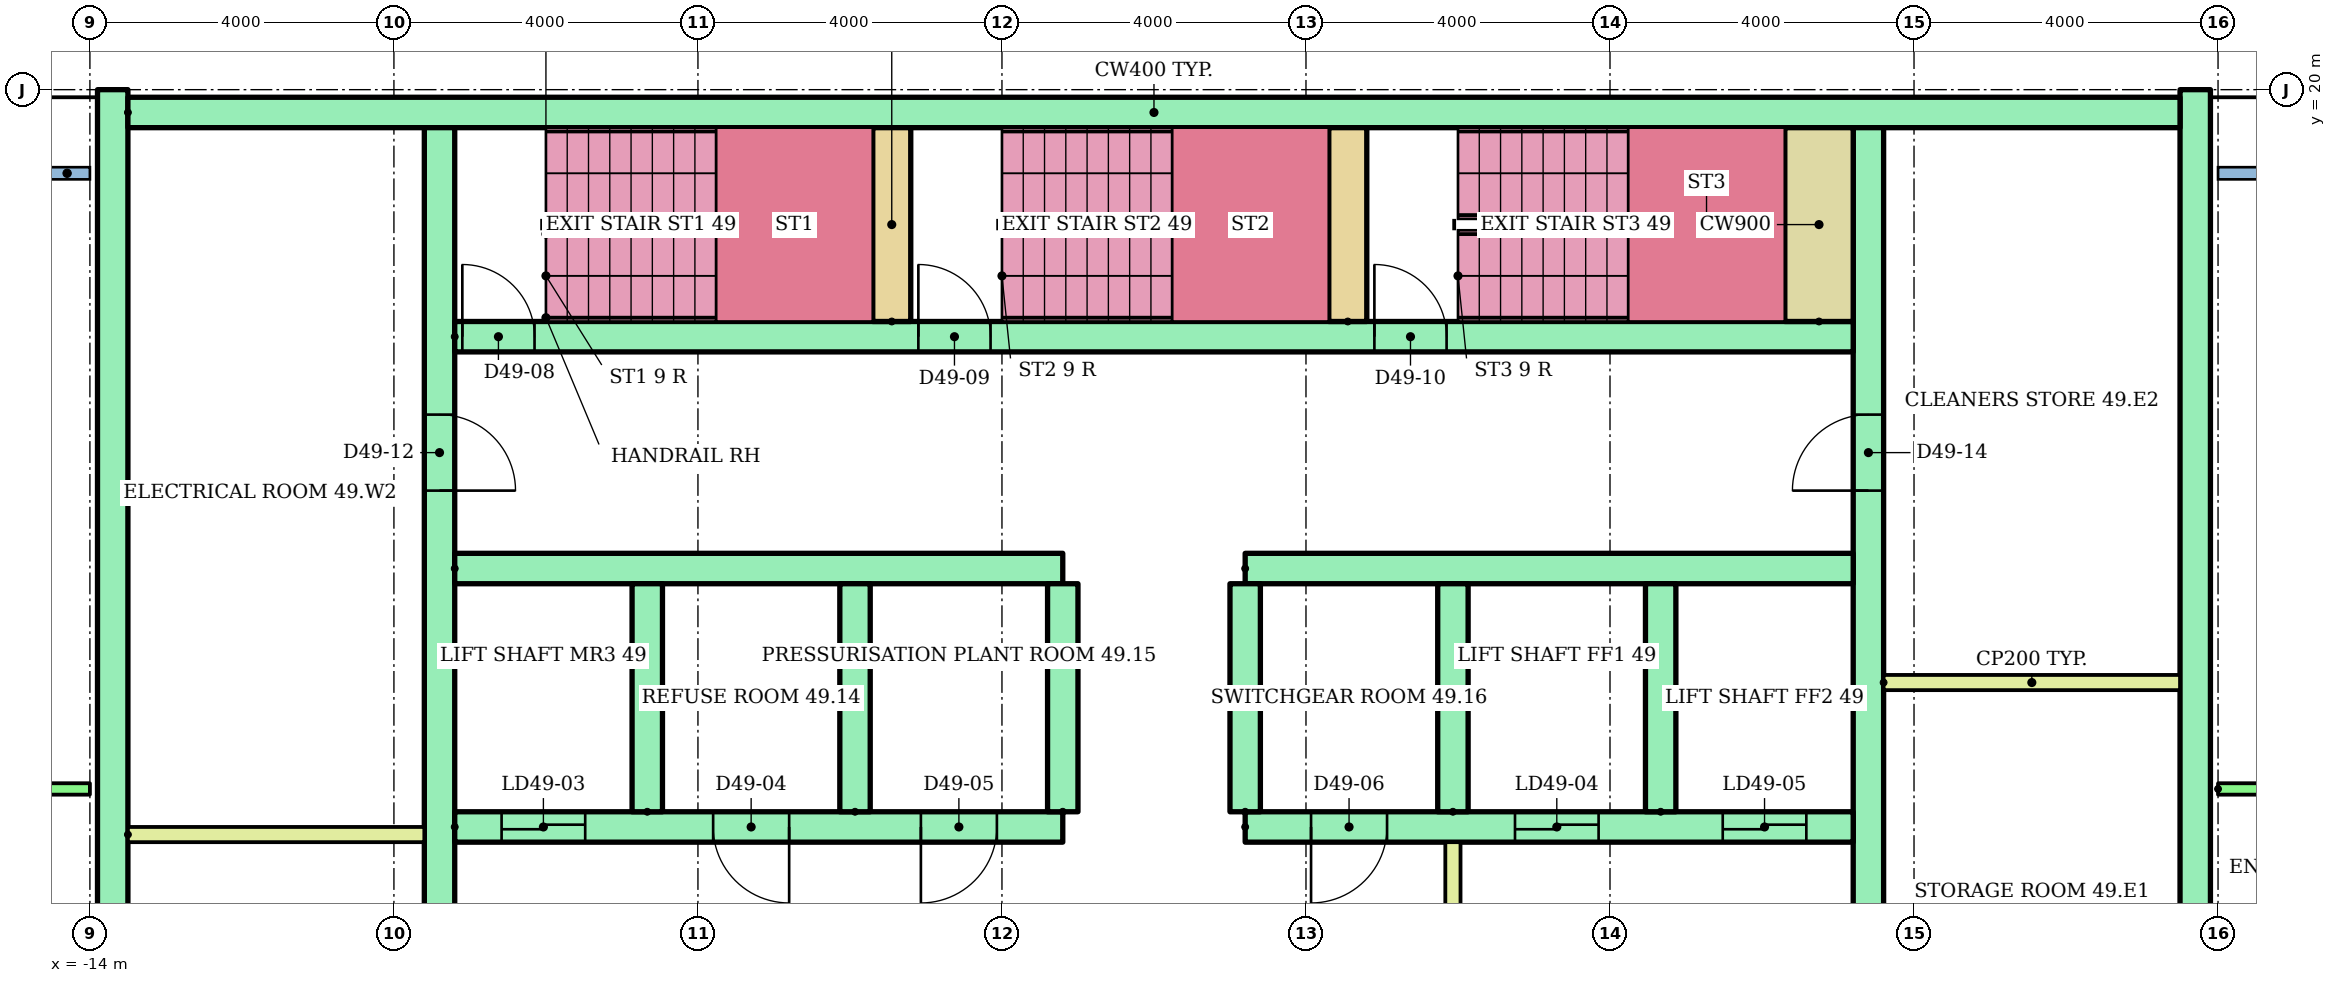
"""IFC4 building model, lengths in metres.
Left out: names, types, materials, properties, quantities, classifications, styles, units other than length and angle.
Written with IfcOpenShell. Run it as: python <this file> out.ifc"""

import sys

from ifc_helpers import new_model, si_unit, direction, frame, frame_2d, origin, place, context, subcontext, project, spatial, rectangle, extrude, element, fill, save


model = new_model("IFC4")
c1 = context("Model", 3, precision=1e-05, world=origin(), true_north=direction((0.0, 1.0)))
c2 = subcontext(c1, "Body", "Model", "MODEL_VIEW")
j1 = project(units=[si_unit("LENGTHUNIT", "METRE"), si_unit("PLANEANGLEUNIT", "RADIAN")], contexts=[c1])
p1 = place(None, origin())
s1 = spatial("IfcSite", under=j1, at=p1, CompositionType="ELEMENT")
p2 = place(p1, origin())
s2 = spatial("IfcBuilding", under=s1, at=p2, CompositionType="ELEMENT")
p3 = place(p2, frame((0.0, 0.0, 187.7)))
s3 = spatial("IfcBuildingStorey", under=s2, at=p3, CompositionType="ELEMENT", Elevation=187.7)
for number, where, z_axis, x_axis in (
    (1, (-13.7, 3.0, 0.0), (0.0, 0.0, 1.0), (0.0, 1.0, 0.0)),
    (2, (13.7, 3.0, 0.0), (0.0, 0.0, 1.0), (0.0, 1.0, 0.0)),
):
    element("IfcWall", number, at=place(p3, frame(where, z_axis=z_axis, x_axis=x_axis)), inside=s3, PredefinedType="SHEAR", context=c2, shape_type="SweptSolid", body=[
        extrude(rectangle(XDim=17.0, YDim=0.4, at=frame_2d((8.5, 0.0))), origin(), (0.0, 0.0, 1.0), 2.92),
    ])
p4 = place(p3, frame((-13.5, 19.7, 0.0)))
e3 = element("IfcWall", 3, at=p4, inside=s3, PredefinedType="SHEAR", context=c2, shape_type="SweptSolid", body=[
    extrude(rectangle(XDim=27.0, YDim=0.4, at=frame_2d((13.5, 0.0))), origin(), (0.0, 0.0, 1.0), 2.92),
])
p5 = place(p3, frame((-9.4, 6.8, 0.0), z_axis=(0.0, 0.0, 1.0), x_axis=(0.0, 1.0, 0.0)))
e4 = element("IfcWall", 4, at=p5, inside=s3, PredefinedType="SHEAR", context=c2, shape_type="SweptSolid", body=[
    extrude(rectangle(XDim=12.7, YDim=0.4, at=frame_2d((6.35, 0.0))), origin(), (0.0, 0.0, 1.0), 2.92),
])
p6 = place(p5, frame((1.15, 0.0, 0.0)))
e5 = element("IfcOpeningElement", 5, at=p6, cuts=e4, PredefinedType="OPENING", context=c2, shape_type="SweptSolid", body=[
    extrude(rectangle(XDim=1.0, YDim=2.1, at=frame_2d((0.5, 1.05))), frame((0.0, 0.21, 0.0), z_axis=(0.0, -1.0, 0.0), x_axis=(1.0, 0.0, 0.0)), (0.0, 0.0, 1.0), 0.42),
])
p7 = place(p5, frame((7.925, 0.0, 0.0)))
e6 = element("IfcOpeningElement", 6, at=p7, cuts=e4, PredefinedType="OPENING", context=c2, shape_type="SweptSolid", body=[
    extrude(rectangle(XDim=1.0, YDim=2.1, at=frame_2d((0.5, 1.05))), frame((0.0, 0.21, 0.0), z_axis=(0.0, -1.0, 0.0), x_axis=(1.0, 0.0, 0.0)), (0.0, 0.0, 1.0), 0.42),
])
p8 = place(p3, frame((9.4, 6.8, 0.0), z_axis=(0.0, 0.0, 1.0), x_axis=(0.0, 1.0, 0.0)))
e7 = element("IfcWall", 7, at=p8, inside=s3, PredefinedType="SHEAR", context=c2, shape_type="SweptSolid", body=[
    extrude(rectangle(XDim=12.7, YDim=0.4, at=frame_2d((6.35, 0.0))), origin(), (0.0, 0.0, 1.0), 2.92),
])
p9 = place(p8, frame((1.15, 0.0, 0.0)))
e8 = element("IfcOpeningElement", 8, at=p9, cuts=e7, PredefinedType="OPENING", context=c2, shape_type="SweptSolid", body=[
    extrude(rectangle(XDim=1.0, YDim=2.1, at=frame_2d((0.5, 1.05))), frame((0.0, 0.21, 0.0), z_axis=(0.0, -1.0, 0.0), x_axis=(1.0, 0.0, 0.0)), (0.0, 0.0, 1.0), 0.42),
])
p10 = place(p8, frame((7.925, 0.0, 0.0)))
e9 = element("IfcOpeningElement", 9, at=p10, cuts=e7, PredefinedType="OPENING", context=c2, shape_type="SweptSolid", body=[
    extrude(rectangle(XDim=1.0, YDim=2.1, at=frame_2d((0.5, 1.05))), frame((0.0, 0.21, 0.0), z_axis=(0.0, -1.0, 0.0), x_axis=(1.0, 0.0, 0.0)), (0.0, 0.0, 1.0), 0.42),
])
p11 = place(p3, frame((-9.2, 10.3, 0.0)))
e10 = element("IfcWall", 10, at=p11, inside=s3, PredefinedType="SHEAR", context=c2, shape_type="SweptSolid", body=[
    extrude(rectangle(XDim=8.0, YDim=0.4, at=frame_2d((4.0, 0.0))), origin(), (0.0, 0.0, 1.0), 2.92),
])
p12 = place(p11, frame((0.617, 0.0, 0.0)))
e11 = element("IfcOpeningElement", 11, at=p12, cuts=e10, PredefinedType="OPENING", context=c2, shape_type="SweptSolid", body=[
    extrude(rectangle(XDim=1.1, YDim=2.1, at=frame_2d((0.55, 1.05))), frame((0.0, 0.21, 0.0), z_axis=(0.0, -1.0, 0.0), x_axis=(1.0, 0.0, 0.0)), (0.0, 0.0, 1.0), 0.42),
])
p13 = place(p11, frame((3.4, 0.0, 0.0)))
e12 = element("IfcOpeningElement", 12, at=p13, cuts=e10, PredefinedType="OPENING", context=c2, shape_type="SweptSolid", body=[
    extrude(rectangle(XDim=1.0, YDim=2.1, at=frame_2d((0.5, 1.05))), frame((0.0, 0.21, 0.0), z_axis=(0.0, -1.0, 0.0), x_axis=(1.0, 0.0, 0.0)), (0.0, 0.0, 1.0), 0.42),
])
p14 = place(p11, frame((6.133, 0.0, 0.0)))
e13 = element("IfcOpeningElement", 13, at=p14, cuts=e10, PredefinedType="OPENING", context=c2, shape_type="SweptSolid", body=[
    extrude(rectangle(XDim=1.0, YDim=2.1, at=frame_2d((0.5, 1.05))), frame((0.0, 0.21, 0.0), z_axis=(0.0, -1.0, 0.0), x_axis=(1.0, 0.0, 0.0)), (0.0, 0.0, 1.0), 0.42),
])
p15 = place(p3, frame((-9.2, 13.7, 0.0)))
e14 = element("IfcWall", 14, at=p15, inside=s3, PredefinedType="SHEAR", context=c2, shape_type="SweptSolid", body=[
    extrude(rectangle(XDim=8.0, YDim=0.4, at=frame_2d((4.0, 0.0))), origin(), (0.0, 0.0, 1.0), 2.92),
])
p16 = place(p3, frame((1.2, 10.3, 0.0)))
e15 = element("IfcWall", 15, at=p16, inside=s3, PredefinedType="SHEAR", context=c2, shape_type="SweptSolid", body=[
    extrude(rectangle(XDim=8.0, YDim=0.4, at=frame_2d((4.0, 0.0))), origin(), (0.0, 0.0, 1.0), 2.92),
])
p17 = place(p16, frame((3.55, 0.0, 0.0)))
e16 = element("IfcOpeningElement", 16, at=p17, cuts=e15, PredefinedType="OPENING", context=c2, shape_type="SweptSolid", body=[
    extrude(rectangle(XDim=1.1, YDim=2.1, at=frame_2d((0.55, 1.05))), frame((0.0, 0.21, 0.0), z_axis=(0.0, -1.0, 0.0), x_axis=(1.0, 0.0, 0.0)), (0.0, 0.0, 1.0), 0.42),
])
p18 = place(p16, frame((6.283, 0.0, 0.0)))
e17 = element("IfcOpeningElement", 17, at=p18, cuts=e15, PredefinedType="OPENING", context=c2, shape_type="SweptSolid", body=[
    extrude(rectangle(XDim=1.1, YDim=2.1, at=frame_2d((0.55, 1.05))), frame((0.0, 0.21, 0.0), z_axis=(0.0, -1.0, 0.0), x_axis=(1.0, 0.0, 0.0)), (0.0, 0.0, 1.0), 0.42),
])
p19 = place(p16, frame((0.867, 0.0, 0.0)))
e18 = element("IfcOpeningElement", 18, at=p19, cuts=e15, PredefinedType="OPENING", context=c2, shape_type="SweptSolid", body=[
    extrude(rectangle(XDim=1.0, YDim=2.1, at=frame_2d((0.5, 1.05))), frame((0.0, 0.21, 0.0), z_axis=(0.0, -1.0, 0.0), x_axis=(1.0, 0.0, 0.0)), (0.0, 0.0, 1.0), 0.42),
])
p20 = place(p3, frame((1.2, 13.7, 0.0)))
e19 = element("IfcWall", 19, at=p20, inside=s3, PredefinedType="SHEAR", context=c2, shape_type="SweptSolid", body=[
    extrude(rectangle(XDim=8.0, YDim=0.4, at=frame_2d((4.0, 0.0))), origin(), (0.0, 0.0, 1.0), 2.92),
])
for number, where, z_axis, x_axis in (
    (20, (-6.667, 10.5, 0.0), (0.0, 0.0, 1.0), (0.0, 1.0, 0.0)),
    (21, (-3.933, 10.5, 0.0), (0.0, 0.0, 1.0), (0.0, 1.0, 0.0)),
    (22, (-1.2, 10.5, 0.0), (0.0, 0.0, 1.0), (0.0, 1.0, 0.0)),
    (23, (1.2, 10.5, 0.0), (0.0, 0.0, 1.0), (0.0, 1.0, 0.0)),
    (24, (3.933, 10.5, 0.0), (0.0, 0.0, 1.0), (0.0, 1.0, 0.0)),
    (25, (6.667, 10.5, 0.0), (0.0, 0.0, 1.0), (0.0, 1.0, 0.0)),
):
    element("IfcWall", number, at=place(p3, frame(where, z_axis=z_axis, x_axis=x_axis)), inside=s3, PredefinedType="SHEAR", context=c2, shape_type="SweptSolid", body=[
        extrude(rectangle(XDim=3.0, YDim=0.4, at=frame_2d((1.5, 0.0))), origin(), (0.0, 0.0, 1.0), 2.92),
    ])
p21 = place(p3, frame((3.933, 6.8, 0.0), z_axis=(0.0, 0.0, 1.0), x_axis=(0.0, 1.0, 0.0)))
e26 = element("IfcWall", 26, at=p21, inside=s3, PredefinedType="PARTITIONING", context=c2, shape_type="SweptSolid", body=[
    extrude(rectangle(XDim=3.3, YDim=0.2, at=frame_2d((1.65, 0.0))), origin(), (0.0, 0.0, 1.0), 2.92),
])
p22 = place(p21, frame((1.1, 0.0, 0.0)))
e27 = element("IfcOpeningElement", 27, at=p22, cuts=e26, PredefinedType="OPENING", context=c2, shape_type="SweptSolid", body=[
    extrude(rectangle(XDim=1.1, YDim=2.1, at=frame_2d((0.55, 1.05))), frame((0.0, 0.11, 0.0), z_axis=(0.0, -1.0, 0.0), x_axis=(1.0, 0.0, 0.0)), (0.0, 0.0, 1.0), 0.22),
])
p23 = place(p3, frame((-9.2, 16.75, 0.0)))
e28 = element("IfcWall", 28, at=p23, inside=s3, PredefinedType="SHEAR", context=c2, shape_type="SweptSolid", body=[
    extrude(rectangle(XDim=18.4, YDim=0.4, at=frame_2d((9.2, 0.0))), origin(), (0.0, 0.0, 1.0), 2.92),
])
p24 = place(p23, frame((0.1, 0.0, 0.0)))
e29 = element("IfcOpeningElement", 29, at=p24, cuts=e28, PredefinedType="OPENING", context=c2, shape_type="SweptSolid", body=[
    extrude(rectangle(XDim=0.95, YDim=2.1, at=frame_2d((0.475, 1.05))), frame((0.0, 0.21, 0.0), z_axis=(0.0, -1.0, 0.0), x_axis=(1.0, 0.0, 0.0)), (0.0, 0.0, 1.0), 0.42),
])
p25 = place(p23, frame((6.1, 0.0, 0.0)))
e30 = element("IfcOpeningElement", 30, at=p25, cuts=e28, PredefinedType="OPENING", context=c2, shape_type="SweptSolid", body=[
    extrude(rectangle(XDim=0.95, YDim=2.1, at=frame_2d((0.475, 1.05))), frame((0.0, 0.21, 0.0), z_axis=(0.0, -1.0, 0.0), x_axis=(1.0, 0.0, 0.0)), (0.0, 0.0, 1.0), 0.42),
])
p26 = place(p23, frame((12.1, 0.0, 0.0)))
e31 = element("IfcOpeningElement", 31, at=p26, cuts=e28, PredefinedType="OPENING", context=c2, shape_type="SweptSolid", body=[
    extrude(rectangle(XDim=0.95, YDim=2.1, at=frame_2d((0.475, 1.05))), frame((0.0, 0.21, 0.0), z_axis=(0.0, -1.0, 0.0), x_axis=(1.0, 0.0, 0.0)), (0.0, 0.0, 1.0), 0.42),
])
for number, where, z_axis, x_axis in (
    (32, (-3.45, 16.95, 0.0), (0.0, 0.0, 1.0), (0.0, 1.0, 0.0)),
    (33, (2.55, 16.95, 0.0), (0.0, 0.0, 1.0), (0.0, 1.0, 0.0)),
):
    element("IfcWall", number, at=place(p3, frame(where, z_axis=z_axis, x_axis=x_axis)), inside=s3, PredefinedType="SHEAR", context=c2, shape_type="SweptSolid", body=[
        extrude(rectangle(XDim=2.55, YDim=0.5, at=frame_2d((1.275, 0.0))), origin(), (0.0, 0.0, 1.0), 2.92),
    ])
p27 = place(p3, frame((8.75, 16.95, 0.0), z_axis=(0.0, 0.0, 1.0), x_axis=(0.0, 1.0, 0.0)))
e34 = element("IfcWall", 34, at=p27, inside=s3, PredefinedType="SHEAR", context=c2, shape_type="SweptSolid", body=[
    extrude(rectangle(XDim=2.55, YDim=0.9, at=frame_2d((1.275, 0.0))), origin(), (0.0, 0.0, 1.0), 2.92),
])
for number, where in (
    (35, (-13.5, 10.2, 0.0)),
    (36, (9.6, 12.2, 0.0)),
):
    element("IfcWall", number, at=place(p3, frame(where)), inside=s3, PredefinedType="PARTITIONING", context=c2, shape_type="SweptSolid", body=[
        extrude(rectangle(XDim=3.9, YDim=0.2, at=frame_2d((1.95, 0.0))), origin(), (0.0, 0.0, 1.0), 2.92),
    ])
p28 = place(p3, frame((-24.82, 10.8, 0.0)))
e37 = element("IfcWall", 37, at=p28, inside=s3, PredefinedType="PARTITIONING", context=c2, shape_type="SweptSolid", body=[
    extrude(rectangle(XDim=10.82, YDim=0.15, at=frame_2d((5.41, 0.0))), origin(), (0.0, 0.0, 1.0), 2.4),
])
p29 = place(p28, frame((1.273, 0.0, 0.0)))
e38 = element("IfcOpeningElement", 38, at=p29, cuts=e37, PredefinedType="OPENING", context=c2, shape_type="SweptSolid", body=[
    extrude(rectangle(XDim=1.0, YDim=2.1, at=frame_2d((0.5, 1.05))), frame((0.0, 0.085, 0.0), z_axis=(0.0, -1.0, 0.0), x_axis=(1.0, 0.0, 0.0)), (0.0, 0.0, 1.0), 0.17),
])
p30 = place(p28, frame((7.32, 0.0, 0.0)))
e39 = element("IfcOpeningElement", 39, at=p30, cuts=e37, PredefinedType="OPENING", context=c2, shape_type="SweptSolid", body=[
    extrude(rectangle(XDim=0.9, YDim=2.1, at=frame_2d((0.45, 1.05))), frame((0.0, 0.085, 0.0), z_axis=(0.0, -1.0, 0.0), x_axis=(1.0, 0.0, 0.0)), (0.0, 0.0, 1.0), 0.17),
])
p31 = place(p3, frame((14.0, 10.8, 0.0)))
e40 = element("IfcWall", 40, at=p31, inside=s3, PredefinedType="PARTITIONING", context=c2, shape_type="SweptSolid", body=[
    extrude(rectangle(XDim=12.0, YDim=0.15, at=frame_2d((6.0, 0.0))), origin(), (0.0, 0.0, 1.0), 2.4),
])
p32 = place(p31, frame((1.5, 0.0, 0.0)))
e41 = element("IfcOpeningElement", 41, at=p32, cuts=e40, PredefinedType="OPENING", context=c2, shape_type="SweptSolid", body=[
    extrude(rectangle(XDim=1.0, YDim=2.1, at=frame_2d((0.5, 1.05))), frame((0.0, 0.085, 0.0), z_axis=(0.0, -1.0, 0.0), x_axis=(1.0, 0.0, 0.0)), (0.0, 0.0, 1.0), 0.17),
])
p33 = place(p31, frame((7.55, 0.0, 0.0)))
e42 = element("IfcOpeningElement", 42, at=p33, cuts=e40, PredefinedType="OPENING", context=c2, shape_type="SweptSolid", body=[
    extrude(rectangle(XDim=0.9, YDim=2.1, at=frame_2d((0.45, 1.05))), frame((0.0, 0.085, 0.0), z_axis=(0.0, -1.0, 0.0), x_axis=(1.0, 0.0, 0.0)), (0.0, 0.0, 1.0), 0.17),
])
p34 = place(p12, origin())
e43 = element("IfcDoor", 43, at=p34, inside=s3, OperationType="SLIDING_TO_LEFT", PredefinedType="DOOR", context=c2, shape_type="SweptSolid", body=[
    extrude(rectangle(XDim=1.1, YDim=2.1, at=frame_2d((0.55, 1.05))), frame((0.0, 0.025, 0.0), z_axis=(0.0, -1.0, 0.0), x_axis=(1.0, 0.0, 0.0)), (0.0, 0.0, 1.0), 0.05),
])
fill(e11, e43)
p35 = place(p17, origin())
e44 = element("IfcDoor", 44, at=p35, inside=s3, OperationType="SLIDING_TO_LEFT", PredefinedType="DOOR", context=c2, shape_type="SweptSolid", body=[
    extrude(rectangle(XDim=1.1, YDim=2.1, at=frame_2d((0.55, 1.05))), frame((0.0, 0.025, 0.0), z_axis=(0.0, -1.0, 0.0), x_axis=(1.0, 0.0, 0.0)), (0.0, 0.0, 1.0), 0.05),
])
fill(e16, e44)
p36 = place(p18, origin())
e45 = element("IfcDoor", 45, at=p36, inside=s3, OperationType="SLIDING_TO_LEFT", PredefinedType="DOOR", context=c2, shape_type="SweptSolid", body=[
    extrude(rectangle(XDim=1.1, YDim=2.1, at=frame_2d((0.55, 1.05))), frame((0.0, 0.025, 0.0), z_axis=(0.0, -1.0, 0.0), x_axis=(1.0, 0.0, 0.0)), (0.0, 0.0, 1.0), 0.05),
])
fill(e17, e45)
p37 = place(p13, frame((1.0, 0.0, 0.0), z_axis=(0.0, 0.0, 1.0), x_axis=(-1.0, 0.0, 0.0)))
e46 = element("IfcDoor", 46, at=p37, inside=s3, OperationType="SINGLE_SWING_RIGHT", PredefinedType="DOOR", context=c2, shape_type="SweptSolid", body=[
    extrude(rectangle(XDim=1.0, YDim=2.1, at=frame_2d((0.5, 1.05))), frame((0.0, 0.025, 0.0), z_axis=(0.0, -1.0, 0.0), x_axis=(1.0, 0.0, 0.0)), (0.0, 0.0, 1.0), 0.05),
])
fill(e12, e46)
p38 = place(p14, frame((1.0, 0.0, 0.0), z_axis=(0.0, 0.0, 1.0), x_axis=(-1.0, 0.0, 0.0)))
e47 = element("IfcDoor", 47, at=p38, inside=s3, OperationType="SINGLE_SWING_LEFT", PredefinedType="DOOR", context=c2, shape_type="SweptSolid", body=[
    extrude(rectangle(XDim=1.0, YDim=2.1, at=frame_2d((0.5, 1.05))), frame((0.0, 0.025, 0.0), z_axis=(0.0, -1.0, 0.0), x_axis=(1.0, 0.0, 0.0)), (0.0, 0.0, 1.0), 0.05),
])
fill(e13, e47)
p39 = place(p19, frame((1.0, 0.0, 0.0), z_axis=(0.0, 0.0, 1.0), x_axis=(-1.0, 0.0, 0.0)))
e48 = element("IfcDoor", 48, at=p39, inside=s3, OperationType="SINGLE_SWING_LEFT", PredefinedType="DOOR", context=c2, shape_type="SweptSolid", body=[
    extrude(rectangle(XDim=1.0, YDim=2.1, at=frame_2d((0.5, 1.05))), frame((0.0, 0.025, 0.0), z_axis=(0.0, -1.0, 0.0), x_axis=(1.0, 0.0, 0.0)), (0.0, 0.0, 1.0), 0.05),
])
fill(e18, e48)
p40 = place(p24, origin())
e49 = element("IfcDoor", 49, at=p40, inside=s3, OperationType="SINGLE_SWING_LEFT", PredefinedType="DOOR", context=c2, shape_type="SweptSolid", body=[
    extrude(rectangle(XDim=0.95, YDim=2.1, at=frame_2d((0.475, 1.05))), frame((0.0, 0.025, 0.0), z_axis=(0.0, -1.0, 0.0), x_axis=(1.0, 0.0, 0.0)), (0.0, 0.0, 1.0), 0.05),
])
fill(e29, e49)
p41 = place(p25, origin())
e50 = element("IfcDoor", 50, at=p41, inside=s3, OperationType="SINGLE_SWING_LEFT", PredefinedType="DOOR", context=c2, shape_type="SweptSolid", body=[
    extrude(rectangle(XDim=0.95, YDim=2.1, at=frame_2d((0.475, 1.05))), frame((0.0, 0.025, 0.0), z_axis=(0.0, -1.0, 0.0), x_axis=(1.0, 0.0, 0.0)), (0.0, 0.0, 1.0), 0.05),
])
fill(e30, e50)
p42 = place(p26, origin())
e51 = element("IfcDoor", 51, at=p42, inside=s3, OperationType="SINGLE_SWING_LEFT", PredefinedType="DOOR", context=c2, shape_type="SweptSolid", body=[
    extrude(rectangle(XDim=0.95, YDim=2.1, at=frame_2d((0.475, 1.05))), frame((0.0, 0.025, 0.0), z_axis=(0.0, -1.0, 0.0), x_axis=(1.0, 0.0, 0.0)), (0.0, 0.0, 1.0), 0.05),
])
fill(e31, e51)
p43 = place(p7, frame((1.0, 0.0, 0.0), z_axis=(0.0, 0.0, 1.0), x_axis=(-1.0, 0.0, 0.0)))
e52 = element("IfcDoor", 52, at=p43, inside=s3, OperationType="SINGLE_SWING_LEFT", PredefinedType="DOOR", context=c2, shape_type="SweptSolid", body=[
    extrude(rectangle(XDim=1.0, YDim=2.1, at=frame_2d((0.5, 1.05))), frame((0.0, 0.025, 0.0), z_axis=(0.0, -1.0, 0.0), x_axis=(1.0, 0.0, 0.0)), (0.0, 0.0, 1.0), 0.05),
])
fill(e6, e52)
p44 = place(p10, origin())
e53 = element("IfcDoor", 53, at=p44, inside=s3, OperationType="SINGLE_SWING_LEFT", PredefinedType="DOOR", context=c2, shape_type="SweptSolid", body=[
    extrude(rectangle(XDim=1.0, YDim=2.1, at=frame_2d((0.5, 1.05))), frame((0.0, 0.025, 0.0), z_axis=(0.0, -1.0, 0.0), x_axis=(1.0, 0.0, 0.0)), (0.0, 0.0, 1.0), 0.05),
])
fill(e9, e53)
save(model, sys.argv[1])
